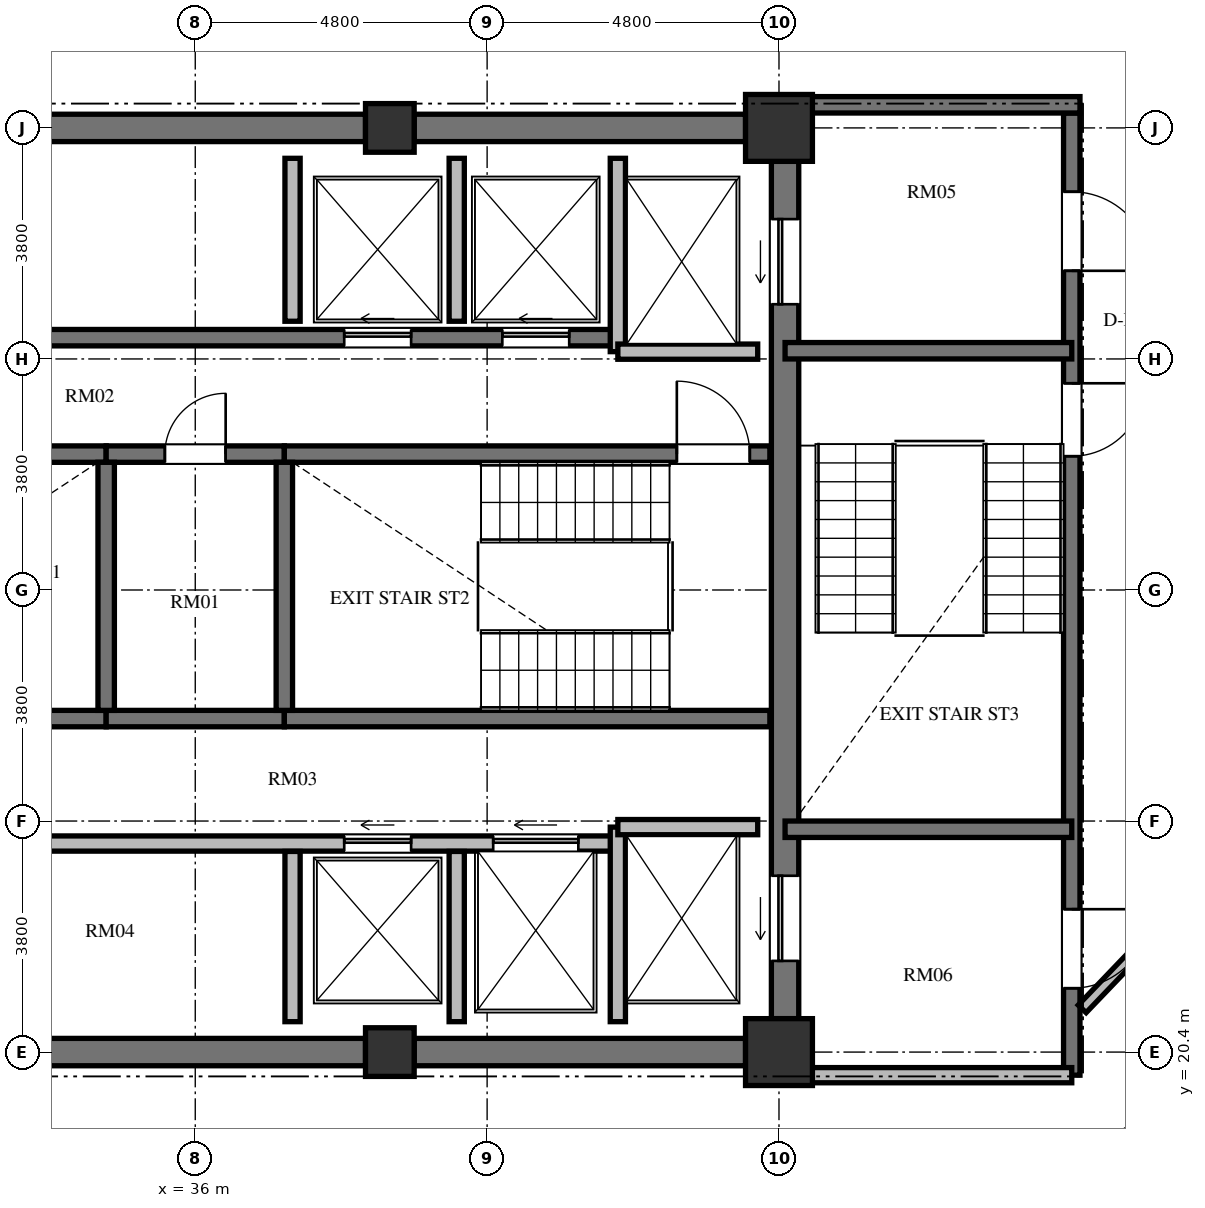
"""IFC4 building model, lengths in metres.
Left out: names, types, materials, properties, quantities, classifications, styles, units other than length and angle.
Written with IfcOpenShell. Run it as: python <this file> out.ifc"""

import sys

from ifc_helpers import new_model, si_unit, direction, frame, frame_2d, origin, origin_2d, place, context, subcontext, project, spatial, rectangle, extrude, element, fill, save


model = new_model("IFC4")
c1 = context("Model", 3, precision=1e-05, world=origin(), true_north=direction((0.0, 1.0)))
c2 = subcontext(c1, "Body", "Model", "MODEL_VIEW")
j1 = project(units=[si_unit("LENGTHUNIT", "METRE"), si_unit("PLANEANGLEUNIT", "RADIAN")], contexts=[c1])
p1 = place(None, origin())
s1 = spatial("IfcSite", under=j1, at=p1, CompositionType="ELEMENT")
p2 = place(p1, origin())
s2 = spatial("IfcBuilding", under=s1, at=p2, CompositionType="ELEMENT")
p3 = place(p2, frame((0.0, 0.0, 238.608)))
s3 = spatial("IfcBuildingStorey", under=s2, at=p3, CompositionType="ELEMENT", Elevation=238.608)
p4 = place(p3, frame((39.2, 20.4, 0.0), z_axis=(0.0, 0.0, 1.0), x_axis=(1.0, 0.0, 0.0)))
e1 = element("IfcColumn", 1, at=p4, inside=s3, PredefinedType="COLUMN", context=c2, shape_type="SweptSolid", body=[
    extrude(rectangle(XDim=0.8, YDim=0.8, at=origin_2d()), origin(), (0.0, 0.0, 1.0), 3.648),
])
for number, where, z_axis, x_axis in (
    (2, (45.6, 20.4, 0.0), (0.0, 0.0, 1.0), (1.0, 0.0, 0.0)),
    (3, (45.6, 35.6, 0.0), (0.0, 0.0, 1.0), (1.0, 0.0, 0.0)),
):
    element("IfcColumn", number, at=place(p3, frame(where, z_axis=z_axis, x_axis=x_axis)), inside=s3, PredefinedType="COLUMN", context=c2, shape_type="SweptSolid", body=[
        extrude(rectangle(XDim=1.1, YDim=1.1, at=origin_2d()), origin(), (0.0, 0.0, 1.0), 3.648),
    ])
p5 = place(p3, frame((39.2, 35.6, 0.0), z_axis=(0.0, 0.0, 1.0), x_axis=(1.0, 0.0, 0.0)))
e4 = element("IfcColumn", 4, at=p5, inside=s3, PredefinedType="COLUMN", context=c2, shape_type="SweptSolid", body=[
    extrude(rectangle(XDim=0.8, YDim=0.8, at=origin_2d()), origin(), (0.0, 0.0, 1.0), 3.648),
])
p6 = place(p3, frame((45.7, 20.95, 0.0), z_axis=(0.0, 0.0, 1.0), x_axis=(0.0, 1.0, 0.0)))
e5 = element("IfcWall", 5, at=p6, inside=s3, PredefinedType="SHEAR", context=c2, shape_type="SweptSolid", body=[
    extrude(rectangle(XDim=14.1, YDim=0.45, at=frame_2d((7.05, 0.0))), origin(), (0.0, 0.0, 1.0), 3.648),
])
p7 = place(p6, frame((11.75, 0.0, 0.0)))
e6 = element("IfcOpeningElement", 6, at=p7, cuts=e5, PredefinedType="OPENING", context=c2, shape_type="SweptSolid", body=[
    extrude(rectangle(XDim=1.4, YDim=2.3, at=frame_2d((0.7, 1.15))), frame((0.0, 0.235, 0.0), z_axis=(0.0, -1.0, 0.0), x_axis=(1.0, 0.0, 0.0)), (0.0, 0.0, 1.0), 0.47),
])
p8 = place(p6, frame((0.95, 0.0, 0.0)))
e7 = element("IfcOpeningElement", 7, at=p8, cuts=e5, PredefinedType="OPENING", context=c2, shape_type="SweptSolid", body=[
    extrude(rectangle(XDim=1.4, YDim=2.3, at=frame_2d((0.7, 1.15))), frame((0.0, 0.235, 0.0), z_axis=(0.0, -1.0, 0.0), x_axis=(1.0, 0.0, 0.0)), (0.0, 0.0, 1.0), 0.47),
])
for number, where, z_axis, x_axis in (
    (8, (33.2, 20.4, 0.0), (0.0, 0.0, 1.0), (1.0, 0.0, 0.0)),
    (9, (33.2, 35.6, 0.0), (0.0, 0.0, 1.0), (1.0, 0.0, 0.0)),
):
    element("IfcWall", number, at=place(p3, frame(where, z_axis=z_axis, x_axis=x_axis)), inside=s3, PredefinedType="SHEAR", context=c2, shape_type="SweptSolid", body=[
        extrude(rectangle(XDim=5.6, YDim=0.45, at=frame_2d((2.8, 0.0))), origin(), (0.0, 0.0, 1.0), 3.648),
    ])
for number, where, z_axis, x_axis in (
    (10, (39.6, 20.4, 0.0), (0.0, 0.0, 1.0), (1.0, 0.0, 0.0)),
    (11, (39.6, 35.6, 0.0), (0.0, 0.0, 1.0), (1.0, 0.0, 0.0)),
):
    element("IfcWall", number, at=place(p3, frame(where, z_axis=z_axis, x_axis=x_axis)), inside=s3, PredefinedType="SHEAR", context=c2, shape_type="SweptSolid", body=[
        extrude(rectangle(XDim=5.45, YDim=0.45, at=frame_2d((2.725, 0.0))), origin(), (0.0, 0.0, 1.0), 3.648),
    ])
p9 = place(p3, frame((26.55, 30.235, 0.0), z_axis=(0.0, 0.0, 1.0), x_axis=(1.0, 0.0, 0.0)))
e12 = element("IfcWall", 12, at=p9, inside=s3, PredefinedType="SHEAR", context=c2, shape_type="SweptSolid", body=[
    extrude(rectangle(XDim=7.985, YDim=0.27, at=frame_2d((3.992, 0.0))), origin(), (0.0, 0.0, 1.0), 3.648),
])
p10 = place(p3, frame((34.535, 30.235, 0.0), z_axis=(0.0, 0.0, 1.0), x_axis=(1.0, 0.0, 0.0)))
e13 = element("IfcWall", 13, at=p10, inside=s3, PredefinedType="SHEAR", context=c2, shape_type="SweptSolid", body=[
    extrude(rectangle(XDim=2.93, YDim=0.27, at=frame_2d((1.465, 0.0))), origin(), (0.0, 0.0, 1.0), 3.648),
])
p11 = place(p10, frame((0.965, 0.0, 0.0)))
e14 = element("IfcOpeningElement", 14, at=p11, cuts=e13, PredefinedType="OPENING", context=c2, shape_type="SweptSolid", body=[
    extrude(rectangle(XDim=1.0, YDim=2.1, at=frame_2d((0.5, 1.05))), frame((0.0, 0.145, 0.0), z_axis=(0.0, -1.0, 0.0), x_axis=(1.0, 0.0, 0.0)), (0.0, 0.0, 1.0), 0.29),
])
p12 = place(p3, frame((37.465, 30.235, 0.0), z_axis=(0.0, 0.0, 1.0), x_axis=(1.0, 0.0, 0.0)))
e15 = element("IfcWall", 15, at=p12, inside=s3, PredefinedType="SHEAR", context=c2, shape_type="SweptSolid", body=[
    extrude(rectangle(XDim=7.985, YDim=0.27, at=frame_2d((3.992, 0.0))), origin(), (0.0, 0.0, 1.0), 3.648),
])
p13 = place(p12, frame((6.455, 0.0, 0.0)))
e16 = element("IfcOpeningElement", 16, at=p13, cuts=e15, PredefinedType="OPENING", context=c2, shape_type="SweptSolid", body=[
    extrude(rectangle(XDim=1.2, YDim=2.15, at=frame_2d((0.6, 1.075))), frame((0.0, 0.145, 0.0), z_axis=(0.0, -1.0, 0.0), x_axis=(1.0, 0.0, 0.0)), (0.0, 0.0, 1.0), 0.29),
])
p14 = place(p3, frame((26.55, 25.885, 0.0), z_axis=(0.0, 0.0, 1.0), x_axis=(1.0, 0.0, 0.0)))
e17 = element("IfcWall", 17, at=p14, inside=s3, PredefinedType="SHEAR", context=c2, shape_type="SweptSolid", body=[
    extrude(rectangle(XDim=7.985, YDim=0.27, at=frame_2d((3.992, 0.0))), origin(), (0.0, 0.0, 1.0), 3.648),
])
p15 = place(p3, frame((34.535, 25.885, 0.0), z_axis=(0.0, 0.0, 1.0), x_axis=(1.0, 0.0, 0.0)))
e18 = element("IfcWall", 18, at=p15, inside=s3, PredefinedType="SHEAR", context=c2, shape_type="SweptSolid", body=[
    extrude(rectangle(XDim=2.93, YDim=0.27, at=frame_2d((1.465, 0.0))), origin(), (0.0, 0.0, 1.0), 3.648),
])
p16 = place(p3, frame((37.465, 25.885, 0.0), z_axis=(0.0, 0.0, 1.0), x_axis=(1.0, 0.0, 0.0)))
e19 = element("IfcWall", 19, at=p16, inside=s3, PredefinedType="SHEAR", context=c2, shape_type="SweptSolid", body=[
    extrude(rectangle(XDim=7.985, YDim=0.27, at=frame_2d((3.992, 0.0))), origin(), (0.0, 0.0, 1.0), 3.648),
])
for number, where, z_axis, x_axis in (
    (20, (34.535, 26.02, 0.0), (0.0, 0.0, 1.0), (0.0, 1.0, 0.0)),
    (21, (37.465, 26.02, 0.0), (0.0, 0.0, 1.0), (0.0, 1.0, 0.0)),
):
    element("IfcWall", number, at=place(p3, frame(where, z_axis=z_axis, x_axis=x_axis)), inside=s3, PredefinedType="SHEAR", context=c2, shape_type="SweptSolid", body=[
        extrude(rectangle(XDim=4.08, YDim=0.27, at=frame_2d((2.04, 0.0))), origin(), (0.0, 0.0, 1.0), 3.648),
    ])
p17 = place(p3, frame((26.55, 32.15, 0.0), z_axis=(0.0, 0.0, 1.0), x_axis=(1.0, 0.0, 0.0)))
e22 = element("IfcWall", 22, at=p17, inside=s3, PredefinedType="SHEAR", context=c2, shape_type="SweptSolid", body=[
    extrude(rectangle(XDim=16.4, YDim=0.27, at=frame_2d((8.2, 0.0))), origin(), (0.0, 0.0, 1.0), 3.648),
])
p18 = place(p17, frame((5.125, 0.0, 0.0)))
e23 = element("IfcOpeningElement", 23, at=p18, cuts=e22, PredefinedType="OPENING", context=c2, shape_type="SweptSolid", body=[
    extrude(rectangle(XDim=1.05, YDim=2.15, at=frame_2d((0.525, 1.075))), frame((0.0, 0.145, 0.0), z_axis=(0.0, -1.0, 0.0), x_axis=(1.0, 0.0, 0.0)), (0.0, 0.0, 1.0), 0.29),
])
p19 = place(p17, frame((11.9, 0.0, 0.0)))
e24 = element("IfcOpeningElement", 24, at=p19, cuts=e22, PredefinedType="OPENING", context=c2, shape_type="SweptSolid", body=[
    extrude(rectangle(XDim=1.1, YDim=2.2, at=frame_2d((0.55, 1.1))), frame((0.0, 0.145, 0.0), z_axis=(0.0, -1.0, 0.0), x_axis=(1.0, 0.0, 0.0)), (0.0, 0.0, 1.0), 0.29),
])
p20 = place(p17, frame((14.5, 0.0, 0.0)))
e25 = element("IfcOpeningElement", 25, at=p20, cuts=e22, PredefinedType="OPENING", context=c2, shape_type="SweptSolid", body=[
    extrude(rectangle(XDim=1.1, YDim=2.2, at=frame_2d((0.55, 1.1))), frame((0.0, 0.145, 0.0), z_axis=(0.0, -1.0, 0.0), x_axis=(1.0, 0.0, 0.0)), (0.0, 0.0, 1.0), 0.29),
])
p21 = place(p3, frame((26.75, 23.83, 0.0), z_axis=(0.0, 0.0, 1.0), x_axis=(1.0, 0.0, 0.0)))
e26 = element("IfcWall", 26, at=p21, inside=s3, PredefinedType="SOLIDWALL", context=c2, shape_type="SweptSolid", body=[
    extrude(rectangle(XDim=16.2, YDim=0.25, at=frame_2d((8.1, 0.0))), origin(), (0.0, 0.0, 1.0), 3.448),
])
p22 = place(p21, frame((4.75, 0.0, 0.0)))
e27 = element("IfcOpeningElement", 27, at=p22, cuts=e26, PredefinedType="OPENING", context=c2, shape_type="SweptSolid", body=[
    extrude(rectangle(XDim=1.4, YDim=2.2, at=frame_2d((0.7, 1.1))), frame((0.0, 0.135, 0.0), z_axis=(0.0, -1.0, 0.0), x_axis=(1.0, 0.0, 0.0)), (0.0, 0.0, 1.0), 0.27),
])
p23 = place(p21, frame((11.7, 0.0, 0.0)))
e28 = element("IfcOpeningElement", 28, at=p23, cuts=e26, PredefinedType="OPENING", context=c2, shape_type="SweptSolid", body=[
    extrude(rectangle(XDim=1.1, YDim=2.2, at=frame_2d((0.55, 1.1))), frame((0.0, 0.135, 0.0), z_axis=(0.0, -1.0, 0.0), x_axis=(1.0, 0.0, 0.0)), (0.0, 0.0, 1.0), 0.27),
])
p24 = place(p21, frame((14.15, 0.0, 0.0)))
e29 = element("IfcOpeningElement", 29, at=p24, cuts=e26, PredefinedType="OPENING", context=c2, shape_type="SweptSolid", body=[
    extrude(rectangle(XDim=1.4, YDim=2.3, at=frame_2d((0.7, 1.15))), frame((0.0, 0.135, 0.0), z_axis=(0.0, -1.0, 0.0), x_axis=(1.0, 0.0, 0.0)), (0.0, 0.0, 1.0), 0.27),
])
p25 = place(p3, frame((42.95, 31.92, 0.0), z_axis=(0.0, 0.0, 1.0), x_axis=(0.0, 1.0, 0.0)))
e30 = element("IfcWall", 30, at=p25, inside=s3, PredefinedType="SOLIDWALL", context=c2, shape_type="SweptSolid", body=[
    extrude(rectangle(XDim=3.18, YDim=0.25, at=frame_2d((1.59, 0.0))), origin(), (0.0, 0.0, 1.0), 3.448),
])
p26 = place(p3, frame((42.95, 31.92, 0.0), z_axis=(0.0, 0.0, 1.0), x_axis=(1.0, 0.0, 0.0)))
e31 = element("IfcWall", 31, at=p26, inside=s3, PredefinedType="SOLIDWALL", context=c2, shape_type="SweptSolid", body=[
    extrude(rectangle(XDim=2.3, YDim=0.25, at=frame_2d((1.15, 0.0))), origin(), (0.0, 0.0, 1.0), 3.448),
])
p27 = place(p3, frame((42.95, 20.9, 0.0), z_axis=(0.0, 0.0, 1.0), x_axis=(0.0, 1.0, 0.0)))
e32 = element("IfcWall", 32, at=p27, inside=s3, PredefinedType="SOLIDWALL", context=c2, shape_type="SweptSolid", body=[
    extrude(rectangle(XDim=3.2, YDim=0.25, at=frame_2d((1.6, 0.0))), origin(), (0.0, 0.0, 1.0), 3.448),
])
p28 = place(p3, frame((42.95, 24.1, 0.0), z_axis=(0.0, 0.0, 1.0), x_axis=(1.0, 0.0, 0.0)))
e33 = element("IfcWall", 33, at=p28, inside=s3, PredefinedType="SOLIDWALL", context=c2, shape_type="SweptSolid", body=[
    extrude(rectangle(XDim=2.3, YDim=0.25, at=frame_2d((1.15, 0.0))), origin(), (0.0, 0.0, 1.0), 3.448),
])
p29 = place(p3, frame((37.6, 32.42, 0.0), z_axis=(0.0, 0.0, 1.0), x_axis=(0.0, 1.0, 0.0)))
e34 = element("IfcWall", 34, at=p29, inside=s3, PredefinedType="SOLIDWALL", context=c2, shape_type="SweptSolid", body=[
    extrude(rectangle(XDim=2.68, YDim=0.25, at=frame_2d((1.34, 0.0))), origin(), (0.0, 0.0, 1.0), 3.448),
])
p30 = place(p3, frame((37.6, 20.9, 0.0), z_axis=(0.0, 0.0, 1.0), x_axis=(0.0, 1.0, 0.0)))
e35 = element("IfcWall", 35, at=p30, inside=s3, PredefinedType="SOLIDWALL", context=c2, shape_type="SweptSolid", body=[
    extrude(rectangle(XDim=2.8, YDim=0.25, at=frame_2d((1.4, 0.0))), origin(), (0.0, 0.0, 1.0), 3.448),
])
p31 = place(p3, frame((40.3, 32.42, 0.0), z_axis=(0.0, 0.0, 1.0), x_axis=(0.0, 1.0, 0.0)))
e36 = element("IfcWall", 36, at=p31, inside=s3, PredefinedType="SOLIDWALL", context=c2, shape_type="SweptSolid", body=[
    extrude(rectangle(XDim=2.68, YDim=0.25, at=frame_2d((1.34, 0.0))), origin(), (0.0, 0.0, 1.0), 3.448),
])
p32 = place(p3, frame((40.3, 20.9, 0.0), z_axis=(0.0, 0.0, 1.0), x_axis=(0.0, 1.0, 0.0)))
e37 = element("IfcWall", 37, at=p32, inside=s3, PredefinedType="SOLIDWALL", context=c2, shape_type="SweptSolid", body=[
    extrude(rectangle(XDim=2.8, YDim=0.25, at=frame_2d((1.4, 0.0))), origin(), (0.0, 0.0, 1.0), 3.448),
])
p33 = place(p3, frame((50.415, 35.845, 0.0), z_axis=(0.0, 0.0, 1.0), x_axis=(0.0, -1.0, 0.0)))
e38 = element("IfcWall", 38, at=p33, inside=s3, PredefinedType="SHEAR", context=c2, shape_type="SweptSolid", body=[
    extrude(rectangle(XDim=15.825, YDim=0.27, at=frame_2d((7.913, 0.0))), origin(), (0.0, 0.0, 1.0), 3.648),
])
p34 = place(p33, frame((4.445, 0.0, 0.0)))
e39 = element("IfcOpeningElement", 39, at=p34, cuts=e38, PredefinedType="OPENING", context=c2, shape_type="SweptSolid", body=[
    extrude(rectangle(XDim=1.2, YDim=2.15, at=frame_2d((0.6, 1.075))), frame((0.0, 0.145, 0.0), z_axis=(0.0, -1.0, 0.0), x_axis=(1.0, 0.0, 0.0)), (0.0, 0.0, 1.0), 0.29),
])
p35 = place(p33, frame((1.295, 0.0, 0.0)))
e40 = element("IfcOpeningElement", 40, at=p35, cuts=e38, PredefinedType="OPENING", context=c2, shape_type="SweptSolid", body=[
    extrude(rectangle(XDim=1.3, YDim=2.2, at=frame_2d((0.65, 1.1))), frame((0.0, 0.145, 0.0), z_axis=(0.0, -1.0, 0.0), x_axis=(1.0, 0.0, 0.0)), (0.0, 0.0, 1.0), 0.29),
])
p36 = place(p33, frame((13.095, 0.0, 0.0)))
e41 = element("IfcOpeningElement", 41, at=p36, cuts=e38, PredefinedType="OPENING", context=c2, shape_type="SweptSolid", body=[
    extrude(rectangle(XDim=1.3, YDim=2.2, at=frame_2d((0.65, 1.1))), frame((0.0, 0.145, 0.0), z_axis=(0.0, -1.0, 0.0), x_axis=(1.0, 0.0, 0.0)), (0.0, 0.0, 1.0), 0.29),
])
p37 = place(p3, frame((45.925, 35.98, 0.0), z_axis=(0.0, 0.0, 1.0), x_axis=(1.0, 0.0, 0.0)))
e42 = element("IfcWall", 42, at=p37, inside=s3, PredefinedType="SHEAR", context=c2, shape_type="SweptSolid", body=[
    extrude(rectangle(XDim=4.625, YDim=0.27, at=frame_2d((2.312, 0.0))), origin(), (0.0, 0.0, 1.0), 3.648),
])
for number, where, z_axis, x_axis in (
    (43, (45.7, 31.935, 0.0), (0.0, 0.0, 1.0), (1.0, 0.0, 0.0)),
    (44, (45.7, 24.065, 0.0), (0.0, 0.0, 1.0), (1.0, 0.0, 0.0)),
):
    element("IfcWall", number, at=place(p3, frame(where, z_axis=z_axis, x_axis=x_axis)), inside=s3, PredefinedType="SHEAR", context=c2, shape_type="SweptSolid", body=[
        extrude(rectangle(XDim=4.715, YDim=0.27, at=frame_2d((2.357, 0.0))), origin(), (0.0, 0.0, 1.0), 3.648),
    ])
p38 = place(p3, frame((45.7, 20.02, 0.0), z_axis=(0.0, 0.0, 1.0), x_axis=(1.0, 0.0, 0.0)))
e45 = element("IfcWall", 45, at=p38, inside=s3, PredefinedType="SOLIDWALL", context=c2, shape_type="SweptSolid", body=[
    extrude(rectangle(XDim=4.715, YDim=0.25, at=frame_2d((2.357, 0.0))), origin(), (0.0, 0.0, 1.0), 3.448),
])
p39 = place(p3, frame((53.078, 23.714, 0.0), z_axis=(0.0, 0.0, 1.0), x_axis=(-0.691353379446, -0.722516785085, 0.0)))
e46 = element("IfcWall", 46, at=p39, inside=s3, PredefinedType="PARTITIONING", context=c2, shape_type="SweptSolid", body=[
    extrude(rectangle(XDim=3.604, YDim=0.18, at=frame_2d((1.802, 0.0))), origin(), (0.0, 0.0, 1.0), 3.448),
])
p40 = place(p13, origin())
e47 = element("IfcDoor", 47, at=p40, inside=s3, OperationType="SINGLE_SWING_LEFT", PredefinedType="DOOR", context=c2, shape_type="SweptSolid", body=[
    extrude(rectangle(XDim=1.2, YDim=2.15, at=frame_2d((0.6, 1.075))), frame((0.0, 0.025, 0.0), z_axis=(0.0, -1.0, 0.0), x_axis=(1.0, 0.0, 0.0)), (0.0, 0.0, 1.0), 0.05),
])
fill(e16, e47)
p41 = place(p11, origin())
e48 = element("IfcDoor", 48, at=p41, inside=s3, OperationType="SINGLE_SWING_RIGHT", PredefinedType="DOOR", context=c2, shape_type="SweptSolid", body=[
    extrude(rectangle(XDim=1.0, YDim=2.1, at=frame_2d((0.5, 1.05))), frame((0.0, 0.025, 0.0), z_axis=(0.0, -1.0, 0.0), x_axis=(1.0, 0.0, 0.0)), (0.0, 0.0, 1.0), 0.05),
])
fill(e14, e48)
p42 = place(p19, origin())
e49 = element("IfcDoor", 49, at=p42, inside=s3, OperationType="SLIDING_TO_LEFT", PredefinedType="DOOR", context=c2, shape_type="SweptSolid", body=[
    extrude(rectangle(XDim=1.1, YDim=2.2, at=frame_2d((0.55, 1.1))), frame((0.0, 0.025, 0.0), z_axis=(0.0, -1.0, 0.0), x_axis=(1.0, 0.0, 0.0)), (0.0, 0.0, 1.0), 0.05),
])
fill(e24, e49)
p43 = place(p20, origin())
e50 = element("IfcDoor", 50, at=p43, inside=s3, OperationType="SLIDING_TO_LEFT", PredefinedType="DOOR", context=c2, shape_type="SweptSolid", body=[
    extrude(rectangle(XDim=1.1, YDim=2.2, at=frame_2d((0.55, 1.1))), frame((0.0, 0.025, 0.0), z_axis=(0.0, -1.0, 0.0), x_axis=(1.0, 0.0, 0.0)), (0.0, 0.0, 1.0), 0.05),
])
fill(e25, e50)
p44 = place(p23, origin())
e51 = element("IfcDoor", 51, at=p44, inside=s3, OperationType="SLIDING_TO_LEFT", PredefinedType="DOOR", context=c2, shape_type="SweptSolid", body=[
    extrude(rectangle(XDim=1.1, YDim=2.2, at=frame_2d((0.55, 1.1))), frame((0.0, 0.025, 0.0), z_axis=(0.0, -1.0, 0.0), x_axis=(1.0, 0.0, 0.0)), (0.0, 0.0, 1.0), 0.05),
])
fill(e28, e51)
p45 = place(p7, origin())
e52 = element("IfcDoor", 52, at=p45, inside=s3, OperationType="SLIDING_TO_LEFT", PredefinedType="DOOR", context=c2, shape_type="SweptSolid", body=[
    extrude(rectangle(XDim=1.4, YDim=2.3, at=frame_2d((0.7, 1.15))), frame((0.0, 0.025, 0.0), z_axis=(0.0, -1.0, 0.0), x_axis=(1.0, 0.0, 0.0)), (0.0, 0.0, 1.0), 0.05),
])
fill(e6, e52)
p46 = place(p8, origin())
e53 = element("IfcDoor", 53, at=p46, inside=s3, OperationType="SLIDING_TO_LEFT", PredefinedType="DOOR", context=c2, shape_type="SweptSolid", body=[
    extrude(rectangle(XDim=1.4, YDim=2.3, at=frame_2d((0.7, 1.15))), frame((0.0, 0.025, 0.0), z_axis=(0.0, -1.0, 0.0), x_axis=(1.0, 0.0, 0.0)), (0.0, 0.0, 1.0), 0.05),
])
fill(e7, e53)
p47 = place(p24, origin())
e54 = element("IfcDoor", 54, at=p47, inside=s3, OperationType="SLIDING_TO_LEFT", PredefinedType="DOOR", context=c2, shape_type="SweptSolid", body=[
    extrude(rectangle(XDim=1.4, YDim=2.3, at=frame_2d((0.7, 1.15))), frame((0.0, 0.025, 0.0), z_axis=(0.0, -1.0, 0.0), x_axis=(1.0, 0.0, 0.0)), (0.0, 0.0, 1.0), 0.05),
])
fill(e29, e54)
p48 = place(p34, origin())
e55 = element("IfcDoor", 55, at=p48, inside=s3, OperationType="SINGLE_SWING_LEFT", PredefinedType="DOOR", context=c2, shape_type="SweptSolid", body=[
    extrude(rectangle(XDim=1.2, YDim=2.15, at=frame_2d((0.6, 1.075))), frame((0.0, 0.025, 0.0), z_axis=(0.0, -1.0, 0.0), x_axis=(1.0, 0.0, 0.0)), (0.0, 0.0, 1.0), 0.05),
])
fill(e39, e55)
p49 = place(p35, origin())
e56 = element("IfcDoor", 56, at=p49, inside=s3, OperationType="SINGLE_SWING_RIGHT", PredefinedType="DOOR", context=c2, shape_type="SweptSolid", body=[
    extrude(rectangle(XDim=1.3, YDim=2.2, at=frame_2d((0.65, 1.1))), frame((0.0, 0.025, 0.0), z_axis=(0.0, -1.0, 0.0), x_axis=(1.0, 0.0, 0.0)), (0.0, 0.0, 1.0), 0.05),
])
fill(e40, e56)
p50 = place(p36, origin())
e57 = element("IfcDoor", 57, at=p50, inside=s3, OperationType="SINGLE_SWING_LEFT", PredefinedType="DOOR", context=c2, shape_type="SweptSolid", body=[
    extrude(rectangle(XDim=1.3, YDim=2.2, at=frame_2d((0.65, 1.1))), frame((0.0, 0.025, 0.0), z_axis=(0.0, -1.0, 0.0), x_axis=(1.0, 0.0, 0.0)), (0.0, 0.0, 1.0), 0.05),
])
fill(e41, e57)
save(model, sys.argv[1])
